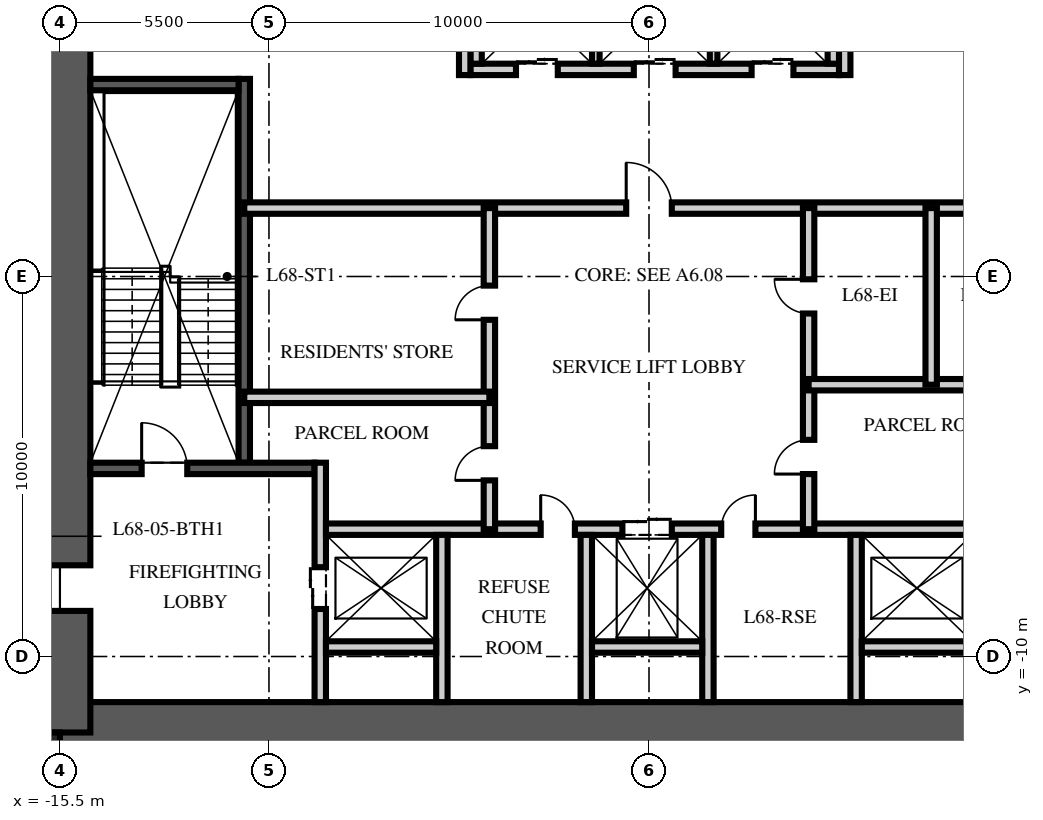
"""IFC4 building model, lengths in metres.
Left out: names, types, materials, properties, quantities, classifications, styles, units other than length and angle.
Written with IfcOpenShell. Run it as: python <this file> out.ifc"""

import sys

from ifc_helpers import new_model, si_unit, direction, frame, frame_2d, origin, origin_2d, place, context, subcontext, project, spatial, rectangle, extrude, element, fill, save


model = new_model("IFC4")
c1 = context("Model", 3, precision=1e-05, world=origin(), true_north=direction((0.0, 1.0)))
c2 = subcontext(c1, "Body", "Model", "MODEL_VIEW")
j1 = project(units=[si_unit("LENGTHUNIT", "METRE"), si_unit("PLANEANGLEUNIT", "RADIAN")], contexts=[c1])
p1 = place(None, origin())
s1 = spatial("IfcSite", under=j1, at=p1, CompositionType="ELEMENT")
p2 = place(p1, origin())
s2 = spatial("IfcBuilding", under=s1, at=p2, CompositionType="ELEMENT")
p3 = place(p2, frame((0.0, 0.0, 270.75)))
s3 = spatial("IfcBuildingStorey", under=s2, at=p3, CompositionType="ELEMENT", Elevation=270.75)
p4 = place(p3, frame((-15.5, -12.0, -0.25), z_axis=(0.0, 0.0, 1.0), x_axis=(1.0, 0.0, 0.0)))
e1 = element("IfcWall", 1, at=p4, inside=s3, PredefinedType="SHEAR", context=c2, shape_type="SweptSolid", body=[
    extrude(rectangle(XDim=31.0, YDim=1.6, at=frame_2d((15.5, 0.0))), origin(), (0.0, 0.0, 1.0), 3.75),
])
p5 = place(p3, frame((-15.5, -12.0, -0.25), z_axis=(0.0, 0.0, 1.0), x_axis=(0.0, 1.0, 0.0)))
e2 = element("IfcWall", 2, at=p5, inside=s3, PredefinedType="SHEAR", context=c2, shape_type="SweptSolid", body=[
    extrude(rectangle(XDim=24.0, YDim=1.6, at=frame_2d((12.0, 0.0))), origin(), (0.0, 0.0, 1.0), 3.75),
])
p6 = place(p5, frame((3.2, 0.0, 0.25)))
e3 = element("IfcOpeningElement", 3, at=p6, cuts=e2, PredefinedType="OPENING", context=c2, shape_type="SweptSolid", body=[
    extrude(rectangle(XDim=1.2, YDim=2.1, at=frame_2d((0.6, 1.05))), frame((0.0, 0.81, 0.0), z_axis=(0.0, -1.0, 0.0), x_axis=(1.0, 0.0, 0.0)), (0.0, 0.0, 1.0), 1.62),
])
p7 = place(p5, frame((19.3, 0.0, 0.25)))
e4 = element("IfcOpeningElement", 4, at=p7, cuts=e2, PredefinedType="OPENING", context=c2, shape_type="SweptSolid", body=[
    extrude(rectangle(XDim=1.8, YDim=2.1, at=frame_2d((0.9, 1.05))), frame((0.0, 0.81, 0.0), z_axis=(0.0, -1.0, 0.0), x_axis=(1.0, 0.0, 0.0)), (0.0, 0.0, 1.0), 1.62),
])
p8 = place(p3, frame((-15.9, -12.4, -0.25), z_axis=(0.0, 0.0, 1.0), x_axis=(1.0, 0.0, 0.0)))
e5 = element("IfcColumn", 5, at=p8, inside=s3, PredefinedType="COLUMN", context=c2, shape_type="SweptSolid", body=[
    extrude(rectangle(XDim=0.8, YDim=0.8, at=origin_2d()), origin(), (0.0, 0.0, 1.0), 3.75),
])
p9 = place(p3, frame((-10.65, -4.9, 0.0), z_axis=(0.0, 0.0, 1.0), x_axis=(0.0, 1.0, 0.0)))
e6 = element("IfcWall", 6, at=p9, inside=s3, PredefinedType="SOLIDWALL", context=c2, shape_type="SweptSolid", body=[
    extrude(rectangle(XDim=10.1, YDim=0.3, at=frame_2d((5.05, 0.0))), origin(), (0.0, 0.0, 1.0), 3.5),
])
p10 = place(p3, frame((-14.7, -5.05, 0.0), z_axis=(0.0, 0.0, 1.0), x_axis=(1.0, 0.0, 0.0)))
e7 = element("IfcWall", 7, at=p10, inside=s3, PredefinedType="SOLIDWALL", context=c2, shape_type="SweptSolid", body=[
    extrude(rectangle(XDim=5.9, YDim=0.3, at=frame_2d((2.95, 0.0))), origin(), (0.0, 0.0, 1.0), 3.5),
])
p11 = place(p10, frame((1.35, 0.0, 0.0)))
e8 = element("IfcOpeningElement", 8, at=p11, cuts=e7, PredefinedType="OPENING", context=c2, shape_type="SweptSolid", body=[
    extrude(rectangle(XDim=1.2, YDim=2.1, at=frame_2d((0.6, 1.05))), frame((0.0, 0.16, 0.0), z_axis=(0.0, -1.0, 0.0), x_axis=(1.0, 0.0, 0.0)), (0.0, 0.0, 1.0), 0.32),
])
p12 = place(p3, frame((-14.7, 5.05, 0.0), z_axis=(0.0, 0.0, 1.0), x_axis=(1.0, 0.0, 0.0)))
e9 = element("IfcWall", 9, at=p12, inside=s3, PredefinedType="SOLIDWALL", context=c2, shape_type="SweptSolid", body=[
    extrude(rectangle(XDim=3.9, YDim=0.3, at=frame_2d((1.95, 0.0))), origin(), (0.0, 0.0, 1.0), 3.5),
])
p13 = place(p3, frame((-8.65, -11.2, 0.0), z_axis=(0.0, 0.0, 1.0), x_axis=(0.0, 1.0, 0.0)))
e10 = element("IfcWall", 10, at=p13, inside=s3, PredefinedType="PARTITIONING", context=c2, shape_type="SweptSolid", body=[
    extrude(rectangle(XDim=6.3, YDim=0.3, at=frame_2d((3.15, 0.0))), origin(), (0.0, 0.0, 1.0), 3.5),
])
p14 = place(p13, frame((2.45, 0.0, 0.0)))
e11 = element("IfcOpeningElement", 11, at=p14, cuts=e10, PredefinedType="OPENING", context=c2, shape_type="SweptSolid", body=[
    extrude(rectangle(XDim=1.1, YDim=2.1, at=frame_2d((0.55, 1.05))), frame((0.0, 0.16, 0.0), z_axis=(0.0, -1.0, 0.0), x_axis=(1.0, 0.0, 0.0)), (0.0, 0.0, 1.0), 0.32),
])
p15 = place(p3, frame((-8.5, -6.65, 0.0), z_axis=(0.0, 0.0, 1.0), x_axis=(1.0, 0.0, 0.0)))
e12 = element("IfcWall", 12, at=p15, inside=s3, PredefinedType="PARTITIONING", context=c2, shape_type="SweptSolid", body=[
    extrude(rectangle(XDim=17.0, YDim=0.3, at=frame_2d((8.5, 0.0))), origin(), (0.0, 0.0, 1.0), 3.5),
])
p16 = place(p15, frame((7.8, 0.0, 0.0)))
e13 = element("IfcOpeningElement", 13, at=p16, cuts=e12, PredefinedType="OPENING", context=c2, shape_type="SweptSolid", body=[
    extrude(rectangle(XDim=1.3, YDim=2.4, at=frame_2d((0.65, 1.2))), frame((0.0, 0.16, 0.0), z_axis=(0.0, -1.0, 0.0), x_axis=(1.0, 0.0, 0.0)), (0.0, 0.0, 1.0), 0.32),
])
p17 = place(p15, frame((5.65, 0.0, 0.0)))
e14 = element("IfcOpeningElement", 14, at=p17, cuts=e12, PredefinedType="OPENING", context=c2, shape_type="SweptSolid", body=[
    extrude(rectangle(XDim=0.9, YDim=2.1, at=frame_2d((0.45, 1.05))), frame((0.0, 0.16, 0.0), z_axis=(0.0, -1.0, 0.0), x_axis=(1.0, 0.0, 0.0)), (0.0, 0.0, 1.0), 0.32),
])
p18 = place(p15, frame((10.4, 0.0, 0.0)))
e15 = element("IfcOpeningElement", 15, at=p18, cuts=e12, PredefinedType="OPENING", context=c2, shape_type="SweptSolid", body=[
    extrude(rectangle(XDim=0.9, YDim=2.1, at=frame_2d((0.45, 1.05))), frame((0.0, 0.16, 0.0), z_axis=(0.0, -1.0, 0.0), x_axis=(1.0, 0.0, 0.0)), (0.0, 0.0, 1.0), 0.32),
])
for number, where, z_axis, x_axis in (
    (16, (-5.45, -11.2, 0.0), (0.0, 0.0, 1.0), (0.0, 1.0, 0.0)),
    (17, (-1.65, -11.2, 0.0), (0.0, 0.0, 1.0), (0.0, 1.0, 0.0)),
    (18, (1.55, -11.2, 0.0), (0.0, 0.0, 1.0), (0.0, 1.0, 0.0)),
    (19, (5.45, -11.2, 0.0), (0.0, 0.0, 1.0), (0.0, 1.0, 0.0)),
):
    element("IfcWall", number, at=place(p3, frame(where, z_axis=z_axis, x_axis=x_axis)), inside=s3, PredefinedType="PARTITIONING", context=c2, shape_type="SweptSolid", body=[
        extrude(rectangle(XDim=4.4, YDim=0.3, at=frame_2d((2.2, 0.0))), origin(), (0.0, 0.0, 1.0), 3.5),
    ])
for number, where, z_axis, x_axis in (
    (20, (-8.5, -9.75, 0.0), (0.0, 0.0, 1.0), (1.0, 0.0, 0.0)),
    (21, (-1.5, -9.75, 0.0), (0.0, 0.0, 1.0), (1.0, 0.0, 0.0)),
    (22, (5.6, -9.75, 0.0), (0.0, 0.0, 1.0), (1.0, 0.0, 0.0)),
):
    element("IfcWall", number, at=place(p3, frame(where, z_axis=z_axis, x_axis=x_axis)), inside=s3, PredefinedType="PARTITIONING", context=c2, shape_type="SweptSolid", body=[
        extrude(rectangle(XDim=2.9, YDim=0.3, at=frame_2d((1.45, 0.0))), origin(), (0.0, 0.0, 1.0), 3.5),
    ])
p19 = place(p3, frame((-4.7, 5.45, 0.0), z_axis=(0.0, 0.0, 1.0), x_axis=(1.0, 0.0, 0.0)))
e23 = element("IfcWall", 23, at=p19, inside=s3, PredefinedType="PARTITIONING", context=c2, shape_type="SweptSolid", body=[
    extrude(rectangle(XDim=9.7, YDim=0.3, at=frame_2d((4.85, 0.0))), origin(), (0.0, 0.0, 1.0), 3.5),
])
p20 = place(p19, frame((1.2, 0.0, 0.0)))
e24 = element("IfcOpeningElement", 24, at=p20, cuts=e23, PredefinedType="OPENING", context=c2, shape_type="SweptSolid", body=[
    extrude(rectangle(XDim=1.1, YDim=2.1, at=frame_2d((0.55, 1.05))), frame((0.0, 0.16, 0.0), z_axis=(0.0, -1.0, 0.0), x_axis=(1.0, 0.0, 0.0)), (0.0, 0.0, 1.0), 0.32),
])
p21 = place(p19, frame((4.3, 0.0, 0.0)))
e25 = element("IfcOpeningElement", 25, at=p21, cuts=e23, PredefinedType="OPENING", context=c2, shape_type="SweptSolid", body=[
    extrude(rectangle(XDim=1.1, YDim=2.1, at=frame_2d((0.55, 1.05))), frame((0.0, 0.16, 0.0), z_axis=(0.0, -1.0, 0.0), x_axis=(1.0, 0.0, 0.0)), (0.0, 0.0, 1.0), 0.32),
])
p22 = place(p19, frame((7.4, 0.0, 0.0)))
e26 = element("IfcOpeningElement", 26, at=p22, cuts=e23, PredefinedType="OPENING", context=c2, shape_type="SweptSolid", body=[
    extrude(rectangle(XDim=1.1, YDim=2.1, at=frame_2d((0.55, 1.05))), frame((0.0, 0.16, 0.0), z_axis=(0.0, -1.0, 0.0), x_axis=(1.0, 0.0, 0.0)), (0.0, 0.0, 1.0), 0.32),
])
for number, where, z_axis, x_axis in (
    (27, (-4.55, 5.6, 0.0), (0.0, 0.0, 1.0), (0.0, 1.0, 0.0)),
    (28, (4.85, 5.6, 0.0), (0.0, 0.0, 1.0), (0.0, 1.0, 0.0)),
):
    element("IfcWall", number, at=place(p3, frame(where, z_axis=z_axis, x_axis=x_axis)), inside=s3, PredefinedType="PARTITIONING", context=c2, shape_type="SweptSolid", body=[
        extrude(rectangle(XDim=2.8, YDim=0.3, at=frame_2d((1.4, 0.0))), origin(), (0.0, 0.0, 1.0), 3.5),
    ])
for number, where, z_axis, x_axis in (
    (29, (-1.4, 5.6, 0.0), (0.0, 0.0, 1.0), (0.0, 1.0, 0.0)),
    (30, (1.7, 5.6, 0.0), (0.0, 0.0, 1.0), (0.0, 1.0, 0.0)),
):
    element("IfcWall", number, at=place(p3, frame(where, z_axis=z_axis, x_axis=x_axis)), inside=s3, PredefinedType="PARTITIONING", context=c2, shape_type="SweptSolid", body=[
        extrude(rectangle(XDim=2.8, YDim=0.2, at=frame_2d((1.4, 0.0))), origin(), (0.0, 0.0, 1.0), 3.5),
    ])
p23 = place(p3, frame((-10.65, 1.8, 0.0), z_axis=(0.0, 0.0, 1.0), x_axis=(1.0, 0.0, 0.0)))
e31 = element("IfcWall", 31, at=p23, inside=s3, PredefinedType="PARTITIONING", context=c2, shape_type="SweptSolid", body=[
    extrude(rectangle(XDim=21.3, YDim=0.3, at=frame_2d((10.65, 0.0))), origin(), (0.0, 0.0, 1.0), 3.5),
])
p24 = place(p23, frame((10.05, 0.0, 0.0)))
e32 = element("IfcOpeningElement", 32, at=p24, cuts=e31, PredefinedType="OPENING", context=c2, shape_type="SweptSolid", body=[
    extrude(rectangle(XDim=1.2, YDim=2.1, at=frame_2d((0.6, 1.05))), frame((0.0, 0.16, 0.0), z_axis=(0.0, -1.0, 0.0), x_axis=(1.0, 0.0, 0.0)), (0.0, 0.0, 1.0), 0.32),
])
p25 = place(p23, frame((19.238, 0.0, 0.0)))
e33 = element("IfcOpeningElement", 33, at=p25, cuts=e31, PredefinedType="OPENING", context=c2, shape_type="SweptSolid", body=[
    extrude(rectangle(XDim=0.9, YDim=2.1, at=frame_2d((0.45, 1.05))), frame((0.0, 0.16, 0.0), z_axis=(0.0, -1.0, 0.0), x_axis=(1.0, 0.0, 0.0)), (0.0, 0.0, 1.0), 0.32),
])
p26 = place(p3, frame((-4.2, -6.65, 0.0), z_axis=(0.0, 0.0, 1.0), x_axis=(0.0, 1.0, 0.0)))
e34 = element("IfcWall", 34, at=p26, inside=s3, PredefinedType="PARTITIONING", context=c2, shape_type="SweptSolid", body=[
    extrude(rectangle(XDim=8.45, YDim=0.3, at=frame_2d((4.225, 0.0))), origin(), (0.0, 0.0, 1.0), 3.5),
])
p27 = place(p26, frame((1.285, 0.0, 0.0)))
e35 = element("IfcOpeningElement", 35, at=p27, cuts=e34, PredefinedType="OPENING", context=c2, shape_type="SweptSolid", body=[
    extrude(rectangle(XDim=0.9, YDim=2.1, at=frame_2d((0.45, 1.05))), frame((0.0, 0.16, 0.0), z_axis=(0.0, -1.0, 0.0), x_axis=(1.0, 0.0, 0.0)), (0.0, 0.0, 1.0), 0.32),
])
p28 = place(p26, frame((5.51, 0.0, 0.0)))
e36 = element("IfcOpeningElement", 36, at=p28, cuts=e34, PredefinedType="OPENING", context=c2, shape_type="SweptSolid", body=[
    extrude(rectangle(XDim=0.9, YDim=2.1, at=frame_2d((0.45, 1.05))), frame((0.0, 0.16, 0.0), z_axis=(0.0, -1.0, 0.0), x_axis=(1.0, 0.0, 0.0)), (0.0, 0.0, 1.0), 0.32),
])
p29 = place(p3, frame((4.2, -6.65, 0.0), z_axis=(0.0, 0.0, 1.0), x_axis=(0.0, 1.0, 0.0)))
e37 = element("IfcWall", 37, at=p29, inside=s3, PredefinedType="PARTITIONING", context=c2, shape_type="SweptSolid", body=[
    extrude(rectangle(XDim=8.45, YDim=0.3, at=frame_2d((4.225, 0.0))), origin(), (0.0, 0.0, 1.0), 3.5),
])
p30 = place(p29, frame((1.451, 0.0, 0.0)))
e38 = element("IfcOpeningElement", 38, at=p30, cuts=e37, PredefinedType="OPENING", context=c2, shape_type="SweptSolid", body=[
    extrude(rectangle(XDim=0.9, YDim=2.1, at=frame_2d((0.45, 1.05))), frame((0.0, 0.16, 0.0), z_axis=(0.0, -1.0, 0.0), x_axis=(1.0, 0.0, 0.0)), (0.0, 0.0, 1.0), 0.32),
])
p31 = place(p29, frame((5.676, 0.0, 0.0)))
e39 = element("IfcOpeningElement", 39, at=p31, cuts=e37, PredefinedType="OPENING", context=c2, shape_type="SweptSolid", body=[
    extrude(rectangle(XDim=0.9, YDim=2.1, at=frame_2d((0.45, 1.05))), frame((0.0, 0.16, 0.0), z_axis=(0.0, -1.0, 0.0), x_axis=(1.0, 0.0, 0.0)), (0.0, 0.0, 1.0), 0.32),
])
for number, where, z_axis, x_axis in (
    (40, (-10.65, -3.18, 0.0), (0.0, 0.0, 1.0), (1.0, 0.0, 0.0)),
    (41, (10.65, -2.848, 0.0), (0.0, 0.0, 1.0), (-1.0, 0.0, 0.0)),
):
    element("IfcWall", number, at=place(p3, frame(where, z_axis=z_axis, x_axis=x_axis)), inside=s3, PredefinedType="PARTITIONING", context=c2, shape_type="SweptSolid", body=[
        extrude(rectangle(XDim=6.45, YDim=0.3, at=frame_2d((3.225, 0.0))), origin(), (0.0, 0.0, 1.0), 3.5),
    ])
p32 = place(p3, frame((7.425, -2.848, 0.0), z_axis=(0.0, 0.0, 1.0), x_axis=(0.0, 1.0, 0.0)))
e42 = element("IfcWall", 42, at=p32, inside=s3, PredefinedType="PARTITIONING", context=c2, shape_type="SweptSolid", body=[
    extrude(rectangle(XDim=4.648, YDim=0.3, at=frame_2d((2.324, 0.0))), origin(), (0.0, 0.0, 1.0), 3.5),
])
p33 = place(p3, frame((-4.85, 5.3, 0.0), z_axis=(0.0, 0.0, 1.0), x_axis=(0.0, 1.0, 0.0)))
e43 = element("IfcWall", 43, at=p33, inside=s3, PredefinedType="PARTITIONING", context=c2, shape_type="SweptSolid", body=[
    extrude(rectangle(XDim=5.9, YDim=0.3, at=frame_2d((2.95, 0.0))), origin(), (0.0, 0.0, 1.0), 3.5),
])
p34 = place(p33, frame((4.15, 0.0, 0.0)))
e44 = element("IfcOpeningElement", 44, at=p34, cuts=e43, PredefinedType="OPENING", context=c2, shape_type="SweptSolid", body=[
    extrude(rectangle(XDim=0.9, YDim=2.1, at=frame_2d((0.45, 1.05))), frame((0.0, 0.16, 0.0), z_axis=(0.0, -1.0, 0.0), x_axis=(1.0, 0.0, 0.0)), (0.0, 0.0, 1.0), 0.32),
])
p35 = place(p3, frame((5.15, 5.3, 0.0), z_axis=(0.0, 0.0, 1.0), x_axis=(0.0, 1.0, 0.0)))
e45 = element("IfcWall", 45, at=p35, inside=s3, PredefinedType="PARTITIONING", context=c2, shape_type="SweptSolid", body=[
    extrude(rectangle(XDim=5.9, YDim=0.3, at=frame_2d((2.95, 0.0))), origin(), (0.0, 0.0, 1.0), 3.5),
])
p36 = place(p35, frame((4.15, 0.0, 0.0)))
e46 = element("IfcOpeningElement", 46, at=p36, cuts=e45, PredefinedType="OPENING", context=c2, shape_type="SweptSolid", body=[
    extrude(rectangle(XDim=0.9, YDim=2.1, at=frame_2d((0.45, 1.05))), frame((0.0, 0.16, 0.0), z_axis=(0.0, -1.0, 0.0), x_axis=(1.0, 0.0, 0.0)), (0.0, 0.0, 1.0), 0.32),
])
p37 = place(p11, origin())
e47 = element("IfcDoor", 47, at=p37, inside=s3, OperationType="SINGLE_SWING_LEFT", PredefinedType="DOOR", context=c2, shape_type="SweptSolid", body=[
    extrude(rectangle(XDim=1.2, YDim=2.1, at=frame_2d((0.6, 1.05))), frame((0.0, 0.025, 0.0), z_axis=(0.0, -1.0, 0.0), x_axis=(1.0, 0.0, 0.0)), (0.0, 0.0, 1.0), 0.05),
])
fill(e8, e47)
p38 = place(p6, origin())
e48 = element("IfcDoor", 48, at=p38, inside=s3, OperationType="SINGLE_SWING_LEFT", PredefinedType="DOOR", context=c2, shape_type="SweptSolid", body=[
    extrude(rectangle(XDim=1.2, YDim=2.1, at=frame_2d((0.6, 1.05))), frame((0.0, 0.025, 0.0), z_axis=(0.0, -1.0, 0.0), x_axis=(1.0, 0.0, 0.0)), (0.0, 0.0, 1.0), 0.05),
])
fill(e3, e48)
p39 = place(p14, origin())
e49 = element("IfcDoor", 49, at=p39, inside=s3, OperationType="DOUBLE_DOOR_SLIDING", PredefinedType="DOOR", context=c2, shape_type="SweptSolid", body=[
    extrude(rectangle(XDim=1.1, YDim=2.1, at=frame_2d((0.55, 1.05))), frame((0.0, 0.025, 0.0), z_axis=(0.0, -1.0, 0.0), x_axis=(1.0, 0.0, 0.0)), (0.0, 0.0, 1.0), 0.05),
])
fill(e11, e49)
p40 = place(p20, origin())
e50 = element("IfcDoor", 50, at=p40, inside=s3, OperationType="DOUBLE_DOOR_SLIDING", PredefinedType="DOOR", context=c2, shape_type="SweptSolid", body=[
    extrude(rectangle(XDim=1.1, YDim=2.1, at=frame_2d((0.55, 1.05))), frame((0.0, 0.025, 0.0), z_axis=(0.0, -1.0, 0.0), x_axis=(1.0, 0.0, 0.0)), (0.0, 0.0, 1.0), 0.05),
])
fill(e24, e50)
p41 = place(p21, origin())
e51 = element("IfcDoor", 51, at=p41, inside=s3, OperationType="DOUBLE_DOOR_SLIDING", PredefinedType="DOOR", context=c2, shape_type="SweptSolid", body=[
    extrude(rectangle(XDim=1.1, YDim=2.1, at=frame_2d((0.55, 1.05))), frame((0.0, 0.025, 0.0), z_axis=(0.0, -1.0, 0.0), x_axis=(1.0, 0.0, 0.0)), (0.0, 0.0, 1.0), 0.05),
])
fill(e25, e51)
p42 = place(p22, origin())
e52 = element("IfcDoor", 52, at=p42, inside=s3, OperationType="DOUBLE_DOOR_SLIDING", PredefinedType="DOOR", context=c2, shape_type="SweptSolid", body=[
    extrude(rectangle(XDim=1.1, YDim=2.1, at=frame_2d((0.55, 1.05))), frame((0.0, 0.025, 0.0), z_axis=(0.0, -1.0, 0.0), x_axis=(1.0, 0.0, 0.0)), (0.0, 0.0, 1.0), 0.05),
])
fill(e26, e52)
p43 = place(p16, origin())
e53 = element("IfcDoor", 53, at=p43, inside=s3, OperationType="DOUBLE_DOOR_SLIDING", PredefinedType="DOOR", context=c2, shape_type="SweptSolid", body=[
    extrude(rectangle(XDim=1.3, YDim=2.4, at=frame_2d((0.65, 1.2))), frame((0.0, 0.025, 0.0), z_axis=(0.0, -1.0, 0.0), x_axis=(1.0, 0.0, 0.0)), (0.0, 0.0, 1.0), 0.05),
])
fill(e13, e53)
p44 = place(p24, origin())
e54 = element("IfcDoor", 54, at=p44, inside=s3, OperationType="SINGLE_SWING_LEFT", PredefinedType="DOOR", context=c2, shape_type="SweptSolid", body=[
    extrude(rectangle(XDim=1.2, YDim=2.1, at=frame_2d((0.6, 1.05))), frame((0.0, 0.025, 0.0), z_axis=(0.0, -1.0, 0.0), x_axis=(1.0, 0.0, 0.0)), (0.0, 0.0, 1.0), 0.05),
])
fill(e32, e54)
p45 = place(p17, origin())
e55 = element("IfcDoor", 55, at=p45, inside=s3, OperationType="SINGLE_SWING_LEFT", PredefinedType="DOOR", context=c2, shape_type="SweptSolid", body=[
    extrude(rectangle(XDim=0.9, YDim=2.1, at=frame_2d((0.45, 1.05))), frame((0.0, 0.025, 0.0), z_axis=(0.0, -1.0, 0.0), x_axis=(1.0, 0.0, 0.0)), (0.0, 0.0, 1.0), 0.05),
])
fill(e14, e55)
p46 = place(p18, origin())
e56 = element("IfcDoor", 56, at=p46, inside=s3, OperationType="SINGLE_SWING_RIGHT", PredefinedType="DOOR", context=c2, shape_type="SweptSolid", body=[
    extrude(rectangle(XDim=0.9, YDim=2.1, at=frame_2d((0.45, 1.05))), frame((0.0, 0.025, 0.0), z_axis=(0.0, -1.0, 0.0), x_axis=(1.0, 0.0, 0.0)), (0.0, 0.0, 1.0), 0.05),
])
fill(e15, e56)
p47 = place(p27, origin())
e57 = element("IfcDoor", 57, at=p47, inside=s3, OperationType="SINGLE_SWING_LEFT", PredefinedType="DOOR", context=c2, shape_type="SweptSolid", body=[
    extrude(rectangle(XDim=0.9, YDim=2.1, at=frame_2d((0.45, 1.05))), frame((0.0, 0.025, 0.0), z_axis=(0.0, -1.0, 0.0), x_axis=(1.0, 0.0, 0.0)), (0.0, 0.0, 1.0), 0.05),
])
fill(e35, e57)
p48 = place(p28, origin())
e58 = element("IfcDoor", 58, at=p48, inside=s3, OperationType="SINGLE_SWING_LEFT", PredefinedType="DOOR", context=c2, shape_type="SweptSolid", body=[
    extrude(rectangle(XDim=0.9, YDim=2.1, at=frame_2d((0.45, 1.05))), frame((0.0, 0.025, 0.0), z_axis=(0.0, -1.0, 0.0), x_axis=(1.0, 0.0, 0.0)), (0.0, 0.0, 1.0), 0.05),
])
fill(e36, e58)
p49 = place(p30, origin())
e59 = element("IfcDoor", 59, at=p49, inside=s3, OperationType="SINGLE_SWING_LEFT", PredefinedType="DOOR", context=c2, shape_type="SweptSolid", body=[
    extrude(rectangle(XDim=0.9, YDim=2.1, at=frame_2d((0.45, 1.05))), frame((0.0, 0.025, 0.0), z_axis=(0.0, -1.0, 0.0), x_axis=(1.0, 0.0, 0.0)), (0.0, 0.0, 1.0), 0.05),
])
fill(e38, e59)
p50 = place(p31, origin())
e60 = element("IfcDoor", 60, at=p50, inside=s3, OperationType="SINGLE_SWING_RIGHT", PredefinedType="DOOR", context=c2, shape_type="SweptSolid", body=[
    extrude(rectangle(XDim=0.9, YDim=2.1, at=frame_2d((0.45, 1.05))), frame((0.0, 0.025, 0.0), z_axis=(0.0, -1.0, 0.0), x_axis=(1.0, 0.0, 0.0)), (0.0, 0.0, 1.0), 0.05),
])
fill(e39, e60)
save(model, sys.argv[1])
